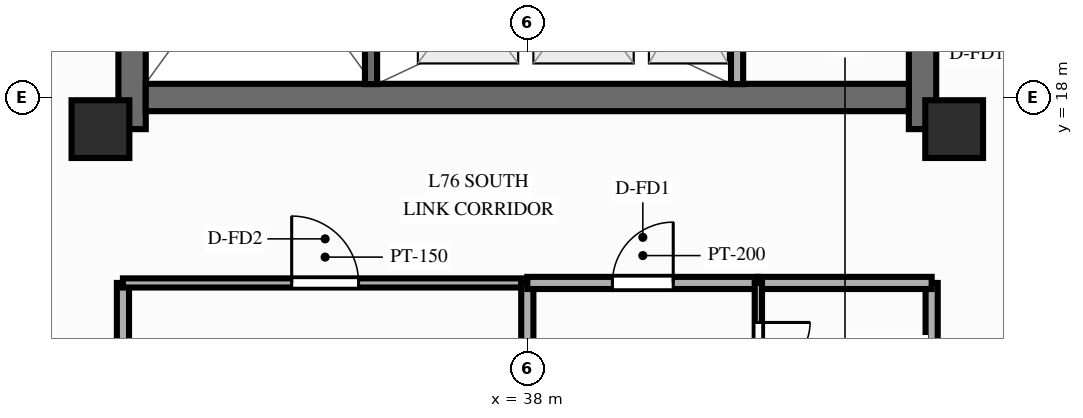
"""IFC4 building model, lengths in metres.
Left out: names, types, materials, properties, quantities, classifications, styles, units other than length and angle.
Written with IfcOpenShell. Run it as: python <this file> out.ifc"""

import sys

from ifc_helpers import new_model, si_unit, direction, frame, frame_2d, origin, origin_2d, place, context, subcontext, project, spatial, rectangle, extrude, source, transform, mapped, element, fill, save


model = new_model("IFC4")
c1 = context("Model", 3, precision=1e-05, world=origin(), true_north=direction((0.0, 1.0)))
c2 = subcontext(c1, "Body", "Model", "MODEL_VIEW")
j1 = project(units=[si_unit("LENGTHUNIT", "METRE"), si_unit("PLANEANGLEUNIT", "RADIAN")], contexts=[c1])
p1 = place(None, origin())
s1 = spatial("IfcSite", under=j1, at=p1, CompositionType="ELEMENT")
p2 = place(p1, origin())
s2 = spatial("IfcBuilding", under=s1, at=p2, CompositionType="ELEMENT")
p3 = place(p2, frame((0.0, 0.0, 246.0)))
s3 = spatial("IfcBuildingStorey", under=s2, at=p3, CompositionType="ELEMENT", Elevation=246.0)
p4 = place(p3, frame((31.5, 17.48, 0.0), z_axis=(0.0, 0.0, 1.0), x_axis=(0.0, 1.0, 0.0)))
e1 = element("IfcWall", 1, at=p4, inside=s3, PredefinedType="SHEAR", context=c2, shape_type="SweptSolid", body=[
    extrude(rectangle(XDim=19.04, YDim=0.45, at=frame_2d((9.52, 0.0))), origin(), (0.0, 0.0, 1.0), 3.0),
])
p5 = place(p4, frame((6.32, 0.0, 0.0)))
e2 = element("IfcOpeningElement", 2, at=p5, cuts=e1, PredefinedType="OPENING", context=c2, shape_type="SweptSolid", body=[
    extrude(rectangle(XDim=1.1, YDim=2.15, at=frame_2d((0.55, 1.075))), frame((0.0, 0.237, 0.0), z_axis=(0.0, -1.0, 0.0), x_axis=(1.0, 0.0, 0.0)), (0.0, 0.0, 1.0), 0.474),
])
p6 = place(p3, frame((44.5, 17.48, 0.0), z_axis=(0.0, 0.0, 1.0), x_axis=(0.0, 1.0, 0.0)))
e3 = element("IfcWall", 3, at=p6, inside=s3, PredefinedType="SHEAR", context=c2, shape_type="SweptSolid", body=[
    extrude(rectangle(XDim=19.04, YDim=0.45, at=frame_2d((9.52, 0.0))), origin(), (0.0, 0.0, 1.0), 3.0),
])
p7 = place(p6, frame((12.67, 0.0, 0.0), z_axis=(0.0, 0.0, 1.0), x_axis=(-1.0, 0.0, 0.0)))
e4 = element("IfcOpeningElement", 4, at=p7, cuts=e3, PredefinedType="OPENING", context=c2, shape_type="SweptSolid", body=[
    extrude(rectangle(XDim=1.1, YDim=2.15, at=frame_2d((0.55, 1.075))), frame((0.0, 0.237, 0.0), z_axis=(0.0, -1.0, 0.0), x_axis=(1.0, 0.0, 0.0)), (0.0, 0.0, 1.0), 0.474),
])
p8 = place(p3, frame((31.725, 18.0, 0.0), z_axis=(0.0, 0.0, 1.0), x_axis=(1.0, 0.0, 0.0)))
e5 = element("IfcWall", 5, at=p8, inside=s3, PredefinedType="SHEAR", context=c2, shape_type="SweptSolid", body=[
    extrude(rectangle(XDim=12.55, YDim=0.45, at=frame_2d((6.275, 0.0))), origin(), (0.0, 0.0, 1.0), 3.0),
])
m1 = source(origin(), c2, "Body", "SweptSolid", [
    extrude(rectangle(XDim=0.95, YDim=0.95, at=origin_2d()), origin(), (0.0, 0.0, 1.0), 3.0),
])
for number, where, z_axis, x_axis in (
    (6, (30.98, 17.48, 0.0), (0.0, 0.0, 1.0), (1.0, 0.0, 0.0)),
    (7, (45.02, 17.48, 0.0), (0.0, 0.0, 1.0), (1.0, 0.0, 0.0)),
):
    element("IfcColumn", number, at=place(p3, frame(where, z_axis=z_axis, x_axis=x_axis)), inside=s3, PredefinedType="COLUMN", context=c2, shape_type="MappedRepresentation", body=[
        mapped(m1, transform((0.0, 0.0, 0.0), scale=1.0)),
    ])
p9 = place(p3, frame((41.45, 18.22, 0.0), z_axis=(0.0, 0.0, 1.0), x_axis=(0.0, 1.0, 0.0)))
e8 = element("IfcWall", 8, at=p9, inside=s3, PredefinedType="PARTITIONING", context=c2, shape_type="SweptSolid", body=[
    extrude(rectangle(XDim=2.86, YDim=0.2, at=frame_2d((1.43, 0.0))), origin(), (0.0, 0.0, 1.0), 2.74),
])
p10 = place(p3, frame((35.43, 18.22, 0.0), z_axis=(0.0, 0.0, 1.0), x_axis=(0.0, 1.0, 0.0)))
e9 = element("IfcWall", 9, at=p10, inside=s3, PredefinedType="SOLIDWALL", context=c2, shape_type="SweptSolid", body=[
    extrude(rectangle(XDim=7.22, YDim=0.2, at=frame_2d((3.61, 0.0))), origin(), (0.0, 0.0, 1.0), 2.74),
])
p11 = place(p10, frame((6.68, 0.0, 0.0), z_axis=(0.0, 0.0, 1.0), x_axis=(-1.0, 0.0, 0.0)))
e10 = element("IfcOpeningElement", 10, at=p11, cuts=e9, PredefinedType="OPENING", context=c2, shape_type="SweptSolid", body=[
    extrude(rectangle(XDim=1.1, YDim=2.15, at=frame_2d((0.55, 1.075))), frame((0.0, 0.112, 0.0), z_axis=(0.0, -1.0, 0.0), x_axis=(1.0, 0.0, 0.0)), (0.0, 0.0, 1.0), 0.224),
])
for number, where, z_axis, x_axis in (
    (11, (31.35, 14.95, 0.0), (0.0, 0.0, 1.0), (0.0, -1.0, 0.0)),
    (12, (44.65, 14.95, 0.0), (0.0, 0.0, 1.0), (0.0, -1.0, 0.0)),
):
    element("IfcWall", number, at=place(p3, frame(where, z_axis=z_axis, x_axis=x_axis)), inside=s3, PredefinedType="PARTITIONING", context=c2, shape_type="SweptSolid", body=[
        extrude(rectangle(XDim=8.8, YDim=0.2, at=frame_2d((4.4, 0.0))), origin(), (0.0, 0.0, 1.0), 2.39),
    ])
p12 = place(p3, frame((31.35, 14.95, 0.0), z_axis=(0.0, 0.0, 1.0), x_axis=(1.0, 0.0, 0.0)))
e13 = element("IfcWall", 13, at=p12, inside=s3, PredefinedType="PARTITIONING", context=c2, shape_type="SweptSolid", body=[
    extrude(rectangle(XDim=6.65, YDim=0.15, at=frame_2d((3.325, 0.0))), origin(), (0.0, 0.0, 1.0), 2.74),
])
p13 = place(p12, frame((2.775, 0.0, 0.0)))
e14 = element("IfcOpeningElement", 14, at=p13, cuts=e13, PredefinedType="OPENING", context=c2, shape_type="SweptSolid", body=[
    extrude(rectangle(XDim=1.1, YDim=2.15, at=frame_2d((0.55, 1.075))), frame((0.0, 0.087, 0.0), z_axis=(0.0, -1.0, 0.0), x_axis=(1.0, 0.0, 0.0)), (0.0, 0.0, 1.0), 0.174),
])
p14 = place(p3, frame((38.0, 14.95, 0.0), z_axis=(0.0, 0.0, 1.0), x_axis=(0.0, -1.0, 0.0)))
e15 = element("IfcWall", 15, at=p14, inside=s3, PredefinedType="PARTITIONING", context=c2, shape_type="SweptSolid", body=[
    extrude(rectangle(XDim=8.8, YDim=0.2, at=frame_2d((4.4, 0.0))), origin(), (0.0, 0.0, 1.0), 2.74),
])
p15 = place(p3, frame((38.0, 14.95, 0.0), z_axis=(0.0, 0.0, 1.0), x_axis=(1.0, 0.0, 0.0)))
e16 = element("IfcWall", 16, at=p15, inside=s3, PredefinedType="PARTITIONING", context=c2, shape_type="SweptSolid", body=[
    extrude(rectangle(XDim=3.8, YDim=0.2, at=frame_2d((1.9, 0.0))), origin(), (0.0, 0.0, 1.0), 2.74),
])
p16 = place(p15, frame((1.4, 0.0, 0.0)))
e17 = element("IfcOpeningElement", 17, at=p16, cuts=e16, PredefinedType="OPENING", context=c2, shape_type="SweptSolid", body=[
    extrude(rectangle(XDim=1.0, YDim=2.15, at=frame_2d((0.5, 1.075))), frame((0.0, 0.112, 0.0), z_axis=(0.0, -1.0, 0.0), x_axis=(1.0, 0.0, 0.0)), (0.0, 0.0, 1.0), 0.224),
])
p17 = place(p3, frame((41.8, 14.95, 0.0), z_axis=(0.0, 0.0, 1.0), x_axis=(1.0, 0.0, 0.0)))
e18 = element("IfcWall", 18, at=p17, inside=s3, PredefinedType="PARTITIONING", context=c2, shape_type="SweptSolid", body=[
    extrude(rectangle(XDim=2.85, YDim=0.2, at=frame_2d((1.425, 0.0))), origin(), (0.0, 0.0, 1.0), 2.74),
])
p18 = place(p3, frame((41.8, 14.95, 0.0), z_axis=(0.0, 0.0, 1.0), x_axis=(0.0, -1.0, 0.0)))
e19 = element("IfcWall", 19, at=p18, inside=s3, PredefinedType="PARTITIONING", context=c2, shape_type="SweptSolid", body=[
    extrude(rectangle(XDim=2.15, YDim=0.12, at=frame_2d((1.075, 0.0))), origin(), (0.0, 0.0, 1.0), 2.74),
])
p19 = place(p18, frame((0.65, 0.0, 0.0)))
e20 = element("IfcOpeningElement", 20, at=p19, cuts=e19, PredefinedType="OPENING", context=c2, shape_type="SweptSolid", body=[
    extrude(rectangle(XDim=0.85, YDim=2.05, at=frame_2d((0.425, 1.025))), frame((0.0, 0.072, 0.0), z_axis=(0.0, -1.0, 0.0), x_axis=(1.0, 0.0, 0.0)), (0.0, 0.0, 1.0), 0.144),
])
m2 = source(origin(), c2, "Body", "SweptSolid", [
    extrude(rectangle(XDim=1.1, YDim=2.15, at=frame_2d((0.55, 1.075))), frame((0.0, 0.025, 0.0), z_axis=(0.0, -1.0, 0.0), x_axis=(1.0, 0.0, 0.0)), (0.0, 0.0, 1.0), 0.05),
])
p20 = place(p13, origin())
e21 = element("IfcDoor", 21, at=p20, inside=s3, OperationType="SINGLE_SWING_LEFT", PredefinedType="DOOR", context=c2, shape_type="MappedRepresentation", body=[
    mapped(m2, transform((0.0, 0.0, 0.0), scale=1.0)),
])
fill(e14, e21)
m3 = source(origin(), c2, "Body", "SweptSolid", [
    extrude(rectangle(XDim=1.0, YDim=2.15, at=frame_2d((0.5, 1.075))), frame((0.0, 0.025, 0.0), z_axis=(0.0, -1.0, 0.0), x_axis=(1.0, 0.0, 0.0)), (0.0, 0.0, 1.0), 0.05),
])
p21 = place(p16, origin())
e22 = element("IfcDoor", 22, at=p21, inside=s3, OperationType="SINGLE_SWING_RIGHT", PredefinedType="DOOR", context=c2, shape_type="MappedRepresentation", body=[
    mapped(m3, transform((0.0, 0.0, 0.0), scale=1.0)),
])
fill(e17, e22)
m4 = source(origin(), c2, "Body", "SweptSolid", [
    extrude(rectangle(XDim=0.85, YDim=2.05, at=frame_2d((0.425, 1.025))), frame((0.0, 0.025, 0.0), z_axis=(0.0, -1.0, 0.0), x_axis=(1.0, 0.0, 0.0)), (0.0, 0.0, 1.0), 0.05),
])
p22 = place(p19, origin())
e23 = element("IfcDoor", 23, at=p22, inside=s3, OperationType="SINGLE_SWING_LEFT", PredefinedType="DOOR", context=c2, shape_type="MappedRepresentation", body=[
    mapped(m4, transform((0.0, 0.0, 0.0), scale=1.0)),
])
fill(e20, e23)
save(model, sys.argv[1])
